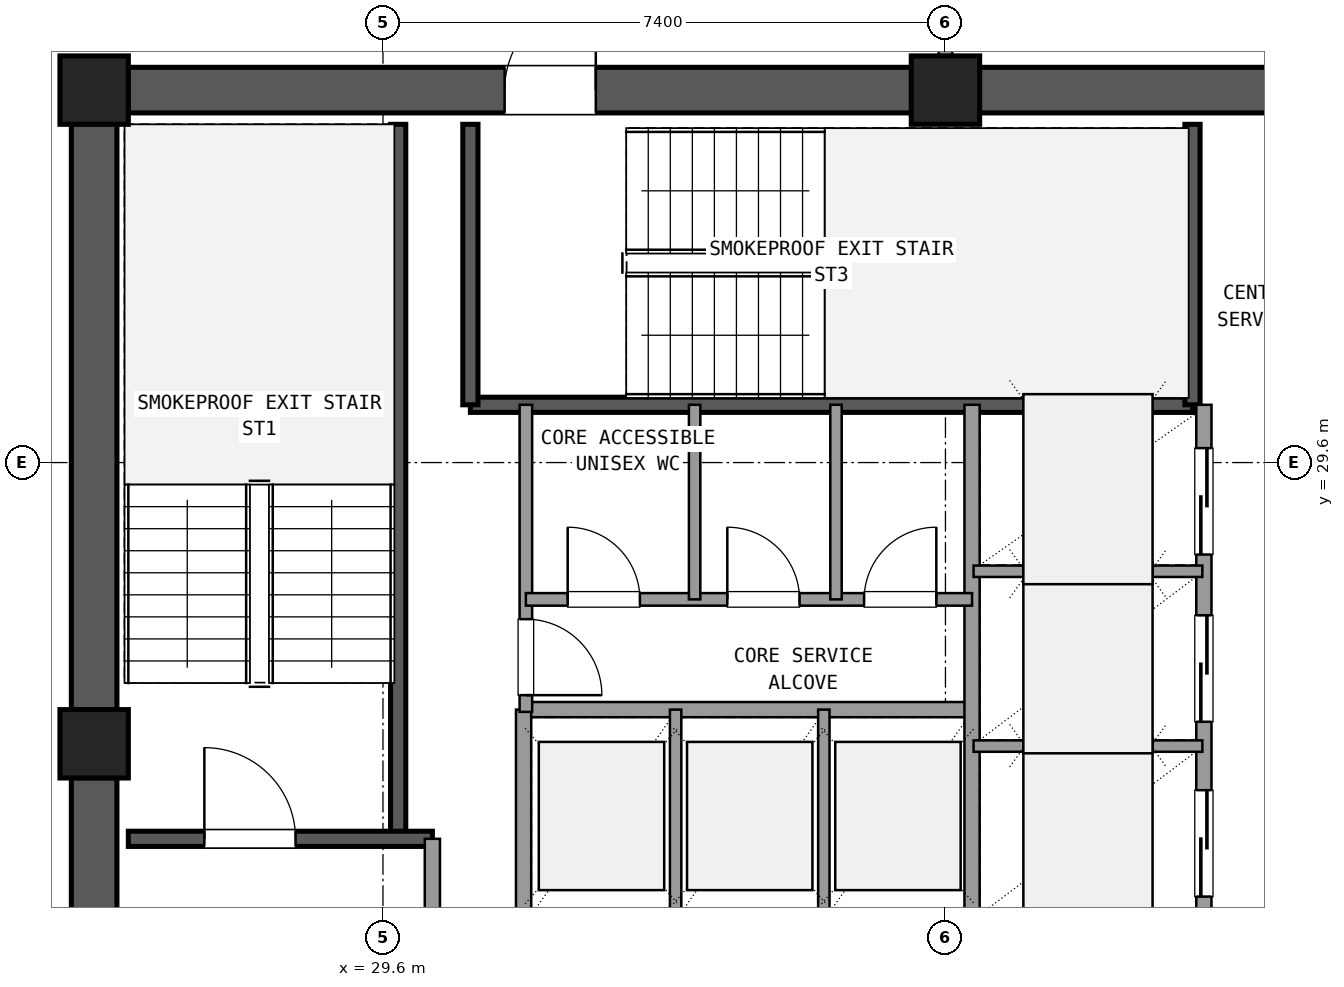
"""IFC4 building model, lengths in metres.
Left out: names, types, materials, properties, quantities, classifications, styles, units other than length and angle.
Written with IfcOpenShell. Run it as: python <this file> out.ifc"""

import sys

from ifc_helpers import new_model, si_unit, direction, frame, frame_2d, origin, origin_2d, place, context, subcontext, project, spatial, rectangle, extrude, element, fill, save


model = new_model("IFC4")
c1 = context("Model", 3, precision=1e-05, world=origin(), true_north=direction((0.0, 1.0)))
c2 = subcontext(c1, "Body", "Model", "MODEL_VIEW")
j1 = project(units=[si_unit("LENGTHUNIT", "METRE"), si_unit("PLANEANGLEUNIT", "RADIAN")], contexts=[c1])
p1 = place(None, origin())
s1 = spatial("IfcSite", under=j1, at=p1, CompositionType="ELEMENT")
p2 = place(p1, origin())
s2 = spatial("IfcBuilding", under=s1, at=p2, CompositionType="ELEMENT")
p3 = place(p2, frame((0.0, 0.0, 250.02)))
s3 = spatial("IfcBuildingStorey", under=s2, at=p3, CompositionType="ELEMENT", Elevation=250.02)
for number, where, z_axis, x_axis in (
    (1, (37.0, 34.5, 0.0), (0.0, 0.0, 1.0), (1.0, 0.0, 0.0)),
    (2, (25.8, 34.5, 0.0), (0.0, 0.0, 1.0), (1.0, 0.0, 0.0)),
    (3, (25.8, 25.9, 0.0), (0.0, 0.0, 1.0), (1.0, 0.0, 0.0)),
):
    element("IfcColumn", number, at=place(p3, frame(where, z_axis=z_axis, x_axis=x_axis)), inside=s3, PredefinedType="COLUMN", context=c2, shape_type="SweptSolid", body=[
        extrude(rectangle(XDim=0.9, YDim=0.9, at=origin_2d()), origin(), (0.0, 0.0, 1.0), 3.6),
    ])
p4 = place(p3, frame((47.755, 34.5, 0.0), z_axis=(0.0, 0.0, 1.0), x_axis=(-1.0, 0.0, 0.0)))
e4 = element("IfcWall", 4, at=p4, inside=s3, PredefinedType="SHEAR", context=c2, shape_type="SweptSolid", body=[
    extrude(rectangle(XDim=10.31, YDim=0.6, at=frame_2d((5.155, 0.0))), origin(), (0.0, 0.0, 1.0), 3.32),
])
p5 = place(p4, frame((4.655, 0.0, 0.0)))
e5 = element("IfcOpeningElement", 5, at=p5, cuts=e4, PredefinedType="OPENING", context=c2, shape_type="SweptSolid", body=[
    extrude(rectangle(XDim=1.6, YDim=2.2, at=frame_2d((0.8, 1.1))), frame((0.0, 0.31, 0.0), z_axis=(0.0, -1.0, 0.0), x_axis=(1.0, 0.0, 0.0)), (0.0, 0.0, 1.0), 0.62),
])
p6 = place(p3, frame((36.555, 34.5, 0.0), z_axis=(0.0, 0.0, 1.0), x_axis=(-1.0, 0.0, 0.0)))
e6 = element("IfcWall", 6, at=p6, inside=s3, PredefinedType="SHEAR", context=c2, shape_type="SweptSolid", body=[
    extrude(rectangle(XDim=10.31, YDim=0.6, at=frame_2d((5.155, 0.0))), origin(), (0.0, 0.0, 1.0), 3.32),
])
p7 = place(p6, frame((4.155, 0.0, 0.0)))
e7 = element("IfcOpeningElement", 7, at=p7, cuts=e6, PredefinedType="OPENING", context=c2, shape_type="SweptSolid", body=[
    extrude(rectangle(XDim=1.2, YDim=2.15, at=frame_2d((0.6, 1.075))), frame((0.0, 0.31, 0.0), z_axis=(0.0, -1.0, 0.0), x_axis=(1.0, 0.0, 0.0)), (0.0, 0.0, 1.0), 0.62),
])
p8 = place(p3, frame((25.8, 34.055, 0.0), z_axis=(0.0, 0.0, 1.0), x_axis=(0.0, -1.0, 0.0)))
e8 = element("IfcWall", 8, at=p8, inside=s3, PredefinedType="SHEAR", context=c2, shape_type="SweptSolid", body=[
    extrude(rectangle(XDim=7.71, YDim=0.6, at=frame_2d((3.855, 0.0))), origin(), (0.0, 0.0, 1.0), 3.32),
])
p9 = place(p3, frame((25.8, 25.455, 0.0), z_axis=(0.0, 0.0, 1.0), x_axis=(0.0, -1.0, 0.0)))
e9 = element("IfcWall", 9, at=p9, inside=s3, PredefinedType="SHEAR", context=c2, shape_type="SweptSolid", body=[
    extrude(rectangle(XDim=7.71, YDim=0.6, at=frame_2d((3.855, 0.0))), origin(), (0.0, 0.0, 1.0), 3.32),
])
p10 = place(p9, frame((2.205, 0.0, 0.0)))
e10 = element("IfcOpeningElement", 10, at=p10, cuts=e9, PredefinedType="OPENING", context=c2, shape_type="SweptSolid", body=[
    extrude(rectangle(XDim=1.2, YDim=2.15, at=frame_2d((0.6, 1.075))), frame((0.0, 0.31, 0.0), z_axis=(0.0, -1.0, 0.0), x_axis=(1.0, 0.0, 0.0)), (0.0, 0.0, 1.0), 0.62),
])
p11 = place(p3, frame((29.8, 24.65, 0.0), z_axis=(0.0, 0.0, 1.0), x_axis=(0.0, 1.0, 0.0)))
e11 = element("IfcWall", 11, at=p11, inside=s3, PredefinedType="SHEAR", context=c2, shape_type="SweptSolid", body=[
    extrude(rectangle(XDim=9.4, YDim=0.2, at=frame_2d((4.7, 0.0))), origin(), (0.0, 0.0, 1.0), 3.32),
])
p12 = place(p3, frame((26.25, 24.65, 0.0), z_axis=(0.0, 0.0, 1.0), x_axis=(1.0, 0.0, 0.0)))
e12 = element("IfcWall", 12, at=p12, inside=s3, PredefinedType="SHEAR", context=c2, shape_type="SweptSolid", body=[
    extrude(rectangle(XDim=4.0, YDim=0.2, at=frame_2d((2.0, 0.0))), origin(), (0.0, 0.0, 1.0), 3.32),
])
p13 = place(p12, frame((1.0, 0.0, 0.0)))
e13 = element("IfcOpeningElement", 13, at=p13, cuts=e12, PredefinedType="OPENING", context=c2, shape_type="SweptSolid", body=[
    extrude(rectangle(XDim=1.2, YDim=2.15, at=frame_2d((0.6, 1.075))), frame((0.0, 0.11, 0.0), z_axis=(0.0, -1.0, 0.0), x_axis=(1.0, 0.0, 0.0)), (0.0, 0.0, 1.0), 0.22),
])
p14 = place(p3, frame((30.75, 30.36, 0.0), z_axis=(0.0, 0.0, 1.0), x_axis=(1.0, 0.0, 0.0)))
e14 = element("IfcWall", 14, at=p14, inside=s3, PredefinedType="SHEAR", context=c2, shape_type="SweptSolid", body=[
    extrude(rectangle(XDim=9.5, YDim=0.2, at=frame_2d((4.75, 0.0))), origin(), (0.0, 0.0, 1.0), 3.32),
])
for number, where, z_axis, x_axis in (
    (15, (30.75, 30.36, 0.0), (0.0, 0.0, 1.0), (0.0, 1.0, 0.0)),
    (16, (40.25, 30.36, 0.0), (0.0, 0.0, 1.0), (0.0, 1.0, 0.0)),
):
    element("IfcWall", number, at=place(p3, frame(where, z_axis=z_axis, x_axis=x_axis)), inside=s3, PredefinedType="SHEAR", context=c2, shape_type="SweptSolid", body=[
        extrude(rectangle(XDim=3.69, YDim=0.2, at=frame_2d((1.845, 0.0))), origin(), (0.0, 0.0, 1.0), 3.32),
    ])
p15 = place(p3, frame((30.25, 17.75, 0.0), z_axis=(0.0, 0.0, 1.0), x_axis=(0.0, 1.0, 0.0)))
e17 = element("IfcWall", 17, at=p15, inside=s3, PredefinedType="SOLIDWALL", context=c2, shape_type="SweptSolid", body=[
    extrude(rectangle(XDim=6.9, YDim=0.2, at=frame_2d((3.45, 0.0))), origin(), (0.0, 0.0, 1.0), 2.61),
])
p16 = place(p15, frame((4.15, 0.0, 0.0)))
e18 = element("IfcOpeningElement", 18, at=p16, cuts=e17, PredefinedType="OPENING", context=c2, shape_type="SweptSolid", body=[
    extrude(rectangle(XDim=1.2, YDim=2.15, at=frame_2d((0.6, 1.075))), frame((0.0, 0.11, 0.0), z_axis=(0.0, -1.0, 0.0), x_axis=(1.0, 0.0, 0.0)), (0.0, 0.0, 1.0), 0.22),
])
p17 = place(p3, frame((31.45, 26.35, 0.0), z_axis=(0.0, 0.0, 1.0), x_axis=(1.0, 0.0, 0.0)))
e19 = element("IfcWall", 19, at=p17, inside=s3, PredefinedType="SOLIDWALL", context=c2, shape_type="SweptSolid", body=[
    extrude(rectangle(XDim=5.9, YDim=0.2, at=frame_2d((2.95, 0.0))), origin(), (0.0, 0.0, 1.0), 2.61),
])
p18 = place(p3, frame((31.45, 23.54, 0.0), z_axis=(0.0, 0.0, 1.0), x_axis=(0.0, 1.0, 0.0)))
e20 = element("IfcWall", 20, at=p18, inside=s3, PredefinedType="SOLIDWALL", context=c2, shape_type="SweptSolid", body=[
    extrude(rectangle(XDim=2.81, YDim=0.2, at=frame_2d((1.405, 0.0))), origin(), (0.0, 0.0, 1.0), 2.61),
])
for number, where, z_axis, x_axis in (
    (21, (33.45, 23.54, 0.0), (0.0, 0.0, 1.0), (0.0, 1.0, 0.0)),
    (22, (35.4, 23.54, 0.0), (0.0, 0.0, 1.0), (0.0, 1.0, 0.0)),
):
    element("IfcWall", number, at=place(p3, frame(where, z_axis=z_axis, x_axis=x_axis)), inside=s3, PredefinedType="PARTITIONING", context=c2, shape_type="SweptSolid", body=[
        extrude(rectangle(XDim=2.81, YDim=0.15, at=frame_2d((1.405, 0.0))), origin(), (0.0, 0.0, 1.0), 2.61),
    ])
p19 = place(p3, frame((37.35, 23.54, 0.0), z_axis=(0.0, 0.0, 1.0), x_axis=(0.0, 1.0, 0.0)))
e23 = element("IfcWall", 23, at=p19, inside=s3, PredefinedType="SOLIDWALL", context=c2, shape_type="SweptSolid", body=[
    extrude(rectangle(XDim=6.82, YDim=0.2, at=frame_2d((3.41, 0.0))), origin(), (0.0, 0.0, 1.0), 2.61),
])
p20 = place(p3, frame((40.4, 23.54, 0.0), z_axis=(0.0, 0.0, 1.0), x_axis=(0.0, 1.0, 0.0)))
e24 = element("IfcWall", 24, at=p20, inside=s3, PredefinedType="SOLIDWALL", context=c2, shape_type="SweptSolid", body=[
    extrude(rectangle(XDim=6.82, YDim=0.2, at=frame_2d((3.41, 0.0))), origin(), (0.0, 0.0, 1.0), 2.61),
])
p21 = place(p20, frame((0.35, 0.0, 0.0)))
e25 = element("IfcOpeningElement", 25, at=p21, cuts=e24, PredefinedType="OPENING", context=c2, shape_type="SweptSolid", body=[
    extrude(rectangle(XDim=1.4, YDim=2.2, at=frame_2d((0.7, 1.1))), frame((0.0, 0.11, 0.0), z_axis=(0.0, -1.0, 0.0), x_axis=(1.0, 0.0, 0.0)), (0.0, 0.0, 1.0), 0.22),
])
p22 = place(p20, frame((2.65, 0.0, 0.0)))
e26 = element("IfcOpeningElement", 26, at=p22, cuts=e24, PredefinedType="OPENING", context=c2, shape_type="SweptSolid", body=[
    extrude(rectangle(XDim=1.4, YDim=2.2, at=frame_2d((0.7, 1.1))), frame((0.0, 0.11, 0.0), z_axis=(0.0, -1.0, 0.0), x_axis=(1.0, 0.0, 0.0)), (0.0, 0.0, 1.0), 0.22),
])
p23 = place(p20, frame((4.85, 0.0, 0.0)))
e27 = element("IfcOpeningElement", 27, at=p23, cuts=e24, PredefinedType="OPENING", context=c2, shape_type="SweptSolid", body=[
    extrude(rectangle(XDim=1.4, YDim=2.2, at=frame_2d((0.7, 1.1))), frame((0.0, 0.11, 0.0), z_axis=(0.0, -1.0, 0.0), x_axis=(1.0, 0.0, 0.0)), (0.0, 0.0, 1.0), 0.22),
])
for number, where, z_axis, x_axis in (
    (28, (37.37, 25.87, 0.0), (0.0, 0.0, 1.0), (1.0, 0.0, 0.0)),
    (29, (37.37, 28.17, 0.0), (0.0, 0.0, 1.0), (1.0, 0.0, 0.0)),
):
    element("IfcWall", number, at=place(p3, frame(where, z_axis=z_axis, x_axis=x_axis)), inside=s3, PredefinedType="PARTITIONING", context=c2, shape_type="SweptSolid", body=[
        extrude(rectangle(XDim=3.01, YDim=0.15, at=frame_2d((1.505, 0.0))), origin(), (0.0, 0.0, 1.0), 2.61),
    ])
p24 = place(p3, frame((31.48, 26.32, 0.0), z_axis=(0.0, 0.0, 1.0), x_axis=(0.0, 1.0, 0.0)))
e30 = element("IfcWall", 30, at=p24, inside=s3, PredefinedType="PLUMBINGWALL", context=c2, shape_type="SweptSolid", body=[
    extrude(rectangle(XDim=4.04, YDim=0.165, at=frame_2d((2.02, 0.0))), origin(), (0.0, 0.0, 1.0), 2.61),
])
p25 = place(p24, frame((0.22, 0.0, 0.0)))
e31 = element("IfcOpeningElement", 31, at=p25, cuts=e30, PredefinedType="OPENING", context=c2, shape_type="SweptSolid", body=[
    extrude(rectangle(XDim=1.0, YDim=2.15, at=frame_2d((0.5, 1.075))), frame((0.0, 0.093, 0.0), z_axis=(0.0, -1.0, 0.0), x_axis=(1.0, 0.0, 0.0)), (0.0, 0.0, 1.0), 0.185),
])
p26 = place(p3, frame((31.48, 27.8, 0.0), z_axis=(0.0, 0.0, 1.0), x_axis=(1.0, 0.0, 0.0)))
e32 = element("IfcWall", 32, at=p26, inside=s3, PredefinedType="PLUMBINGWALL", context=c2, shape_type="SweptSolid", body=[
    extrude(rectangle(XDim=5.87, YDim=0.165, at=frame_2d((2.935, 0.0))), origin(), (0.0, 0.0, 1.0), 2.61),
])
p27 = place(p26, frame((0.55, 0.0, 0.0)))
e33 = element("IfcOpeningElement", 33, at=p27, cuts=e32, PredefinedType="OPENING", context=c2, shape_type="SweptSolid", body=[
    extrude(rectangle(XDim=0.95, YDim=2.1, at=frame_2d((0.475, 1.05))), frame((0.0, 0.093, 0.0), z_axis=(0.0, -1.0, 0.0), x_axis=(1.0, 0.0, 0.0)), (0.0, 0.0, 1.0), 0.185),
])
p28 = place(p26, frame((2.65, 0.0, 0.0)))
e34 = element("IfcOpeningElement", 34, at=p28, cuts=e32, PredefinedType="OPENING", context=c2, shape_type="SweptSolid", body=[
    extrude(rectangle(XDim=0.95, YDim=2.1, at=frame_2d((0.475, 1.05))), frame((0.0, 0.093, 0.0), z_axis=(0.0, -1.0, 0.0), x_axis=(1.0, 0.0, 0.0)), (0.0, 0.0, 1.0), 0.185),
])
p29 = place(p26, frame((4.45, 0.0, 0.0)))
e35 = element("IfcOpeningElement", 35, at=p29, cuts=e32, PredefinedType="OPENING", context=c2, shape_type="SweptSolid", body=[
    extrude(rectangle(XDim=0.95, YDim=2.1, at=frame_2d((0.475, 1.05))), frame((0.0, 0.093, 0.0), z_axis=(0.0, -1.0, 0.0), x_axis=(1.0, 0.0, 0.0)), (0.0, 0.0, 1.0), 0.185),
])
for number, where, z_axis, x_axis in (
    (36, (33.7, 27.8, 0.0), (0.0, 0.0, 1.0), (0.0, 1.0, 0.0)),
    (37, (35.56, 27.8, 0.0), (0.0, 0.0, 1.0), (0.0, 1.0, 0.0)),
):
    element("IfcWall", number, at=place(p3, frame(where, z_axis=z_axis, x_axis=x_axis)), inside=s3, PredefinedType="PARTITIONING", context=c2, shape_type="SweptSolid", body=[
        extrude(rectangle(XDim=2.56, YDim=0.15, at=frame_2d((1.28, 0.0))), origin(), (0.0, 0.0, 1.0), 2.61),
    ])
p30 = place(p3, frame((37.0, 34.95, 0.0), z_axis=(0.0, 0.0, 1.0), x_axis=(0.0, 1.0, 0.0)))
e38 = element("IfcWall", 38, at=p30, inside=s3, PredefinedType="PARTITIONING", context=c2, shape_type="SweptSolid", body=[
    extrude(rectangle(XDim=2.7, YDim=0.18, at=frame_2d((1.35, 0.0))), origin(), (0.0, 0.0, 1.0), 2.61),
])
p31 = place(p30, frame((0.35, 0.0, 0.0)))
e39 = element("IfcOpeningElement", 39, at=p31, cuts=e38, PredefinedType="OPENING", context=c2, shape_type="SweptSolid", body=[
    extrude(rectangle(XDim=2.0, YDim=2.2, at=frame_2d((1.0, 1.1))), frame((0.0, 0.1, 0.0), z_axis=(0.0, -1.0, 0.0), x_axis=(1.0, 0.0, 0.0)), (0.0, 0.0, 1.0), 0.2),
])
p32 = place(p13, origin())
e40 = element("IfcDoor", 40, at=p32, inside=s3, OperationType="SINGLE_SWING_LEFT", PredefinedType="DOOR", context=c2, shape_type="SweptSolid", body=[
    extrude(rectangle(XDim=1.2, YDim=2.15, at=frame_2d((0.6, 1.075))), frame((0.0, 0.025, 0.0), z_axis=(0.0, -1.0, 0.0), x_axis=(1.0, 0.0, 0.0)), (0.0, 0.0, 1.0), 0.05),
])
fill(e13, e40)
p33 = place(p7, frame((1.2, 0.0, 0.0), z_axis=(0.0, 0.0, 1.0), x_axis=(-1.0, 0.0, 0.0)))
e41 = element("IfcDoor", 41, at=p33, inside=s3, OperationType="SINGLE_SWING_LEFT", PredefinedType="DOOR", context=c2, shape_type="SweptSolid", body=[
    extrude(rectangle(XDim=1.2, YDim=2.15, at=frame_2d((0.6, 1.075))), frame((0.0, 0.025, 0.0), z_axis=(0.0, -1.0, 0.0), x_axis=(1.0, 0.0, 0.0)), (0.0, 0.0, 1.0), 0.05),
])
fill(e7, e41)
p34 = place(p21, origin())
e42 = element("IfcDoor", 42, at=p34, inside=s3, OperationType="SLIDING_TO_LEFT", PredefinedType="DOOR", context=c2, shape_type="SweptSolid", body=[
    extrude(rectangle(XDim=1.4, YDim=2.2, at=frame_2d((0.7, 1.1))), frame((0.0, 0.025, 0.0), z_axis=(0.0, -1.0, 0.0), x_axis=(1.0, 0.0, 0.0)), (0.0, 0.0, 1.0), 0.05),
])
fill(e25, e42)
p35 = place(p22, origin())
e43 = element("IfcDoor", 43, at=p35, inside=s3, OperationType="SLIDING_TO_LEFT", PredefinedType="DOOR", context=c2, shape_type="SweptSolid", body=[
    extrude(rectangle(XDim=1.4, YDim=2.2, at=frame_2d((0.7, 1.1))), frame((0.0, 0.025, 0.0), z_axis=(0.0, -1.0, 0.0), x_axis=(1.0, 0.0, 0.0)), (0.0, 0.0, 1.0), 0.05),
])
fill(e26, e43)
p36 = place(p23, origin())
e44 = element("IfcDoor", 44, at=p36, inside=s3, OperationType="SLIDING_TO_RIGHT", PredefinedType="DOOR", context=c2, shape_type="SweptSolid", body=[
    extrude(rectangle(XDim=1.4, YDim=2.2, at=frame_2d((0.7, 1.1))), frame((0.0, 0.025, 0.0), z_axis=(0.0, -1.0, 0.0), x_axis=(1.0, 0.0, 0.0)), (0.0, 0.0, 1.0), 0.05),
])
fill(e27, e44)
p37 = place(p25, frame((1.0, 0.0, 0.0), z_axis=(0.0, 0.0, 1.0), x_axis=(-1.0, 0.0, 0.0)))
e45 = element("IfcDoor", 45, at=p37, inside=s3, OperationType="SINGLE_SWING_LEFT", PredefinedType="DOOR", context=c2, shape_type="SweptSolid", body=[
    extrude(rectangle(XDim=1.0, YDim=2.15, at=frame_2d((0.5, 1.075))), frame((0.0, 0.025, 0.0), z_axis=(0.0, -1.0, 0.0), x_axis=(1.0, 0.0, 0.0)), (0.0, 0.0, 1.0), 0.05),
])
fill(e31, e45)
p38 = place(p27, origin())
e46 = element("IfcDoor", 46, at=p38, inside=s3, OperationType="SINGLE_SWING_LEFT", PredefinedType="DOOR", context=c2, shape_type="SweptSolid", body=[
    extrude(rectangle(XDim=0.95, YDim=2.1, at=frame_2d((0.475, 1.05))), frame((0.0, 0.025, 0.0), z_axis=(0.0, -1.0, 0.0), x_axis=(1.0, 0.0, 0.0)), (0.0, 0.0, 1.0), 0.05),
])
fill(e33, e46)
p39 = place(p28, origin())
e47 = element("IfcDoor", 47, at=p39, inside=s3, OperationType="SINGLE_SWING_LEFT", PredefinedType="DOOR", context=c2, shape_type="SweptSolid", body=[
    extrude(rectangle(XDim=0.95, YDim=2.1, at=frame_2d((0.475, 1.05))), frame((0.0, 0.025, 0.0), z_axis=(0.0, -1.0, 0.0), x_axis=(1.0, 0.0, 0.0)), (0.0, 0.0, 1.0), 0.05),
])
fill(e34, e47)
p40 = place(p29, origin())
e48 = element("IfcDoor", 48, at=p40, inside=s3, OperationType="SINGLE_SWING_RIGHT", PredefinedType="DOOR", context=c2, shape_type="SweptSolid", body=[
    extrude(rectangle(XDim=0.95, YDim=2.1, at=frame_2d((0.475, 1.05))), frame((0.0, 0.025, 0.0), z_axis=(0.0, -1.0, 0.0), x_axis=(1.0, 0.0, 0.0)), (0.0, 0.0, 1.0), 0.05),
])
fill(e35, e48)
save(model, sys.argv[1])
